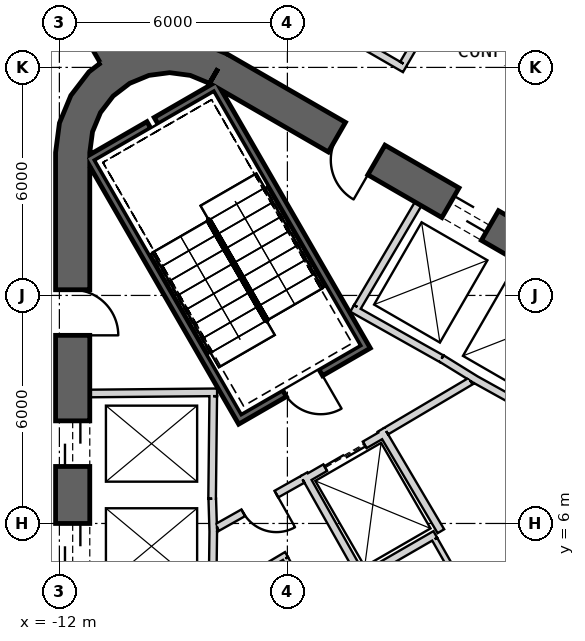
"""IFC4 building model, lengths in metres.
Left out: names, types, materials, properties, quantities, classifications, styles, units other than length and angle.
Written with IfcOpenShell. Run it as: python <this file> out.ifc"""

import sys

from ifc_helpers import new_model, si_unit, direction, frame, frame_2d, origin, place, context, subcontext, project, spatial, polyline, rectangle, outline, extrude, element, fill, save


model = new_model("IFC4")
c1 = context("Model", 3, precision=1e-05, world=origin(), true_north=direction((0.0, 1.0)))
c2 = subcontext(c1, "Body", "Model", "MODEL_VIEW")
j1 = project(units=[si_unit("LENGTHUNIT", "METRE"), si_unit("PLANEANGLEUNIT", "RADIAN")], contexts=[c1])
p1 = place(None, origin())
s1 = spatial("IfcSite", under=j1, at=p1, CompositionType="ELEMENT")
p2 = place(p1, origin())
s2 = spatial("IfcBuilding", under=s1, at=p2, CompositionType="ELEMENT")
p3 = place(p2, frame((0.0, 0.0, 15.5)))
s3 = spatial("IfcBuildingStorey", under=s2, at=p3, CompositionType="ELEMENT", Elevation=15.5)
p4 = place(p3, frame((19.475, 2.208, 0.0), z_axis=(0.0, 0.0, 1.0), x_axis=(-0.866028369851, 0.499994862586, 0.0)))
e1 = element("IfcWall", 1, at=p4, inside=s3, PredefinedType="SHEAR", context=c2, shape_type="SweptSolid", body=[
    extrude(rectangle(XDim=31.523, YDim=0.9, at=frame_2d((15.762, 0.0))), origin(), (0.0, 0.0, 1.0), 6.0),
])
p5 = place(p4, frame((7.062, 0.0, 0.0)))
e2 = element("IfcOpeningElement", 2, at=p5, cuts=e1, PredefinedType="OPENING", context=c2, shape_type="SweptSolid", body=[
    extrude(rectangle(XDim=1.2, YDim=2.4, at=frame_2d((0.6, 1.2))), frame((0.0, 0.46, 0.0), z_axis=(0.0, -1.0, 0.0), x_axis=(1.0, 0.0, 0.0)), (0.0, 0.0, 1.0), 0.92),
])
p6 = place(p4, frame((9.762, 0.0, 0.0)))
e3 = element("IfcOpeningElement", 3, at=p6, cuts=e1, PredefinedType="OPENING", context=c2, shape_type="SweptSolid", body=[
    extrude(rectangle(XDim=1.2, YDim=2.4, at=frame_2d((0.6, 1.2))), frame((0.0, 0.46, 0.0), z_axis=(0.0, -1.0, 0.0), x_axis=(1.0, 0.0, 0.0)), (0.0, 0.0, 1.0), 0.92),
])
p7 = place(p4, frame((12.462, 0.0, 0.0)))
e4 = element("IfcOpeningElement", 4, at=p7, cuts=e1, PredefinedType="OPENING", context=c2, shape_type="SweptSolid", body=[
    extrude(rectangle(XDim=1.2, YDim=2.4, at=frame_2d((0.6, 1.2))), frame((0.0, 0.46, 0.0), z_axis=(0.0, -1.0, 0.0), x_axis=(1.0, 0.0, 0.0)), (0.0, 0.0, 1.0), 0.92),
])
p8 = place(p4, frame((15.162, 0.0, 0.0)))
e5 = element("IfcOpeningElement", 5, at=p8, cuts=e1, PredefinedType="OPENING", context=c2, shape_type="SweptSolid", body=[
    extrude(rectangle(XDim=1.2, YDim=2.4, at=frame_2d((0.6, 1.2))), frame((0.0, 0.46, 0.0), z_axis=(0.0, -1.0, 0.0), x_axis=(1.0, 0.0, 0.0)), (0.0, 0.0, 1.0), 0.92),
])
p9 = place(p4, frame((17.862, 0.0, 0.0)))
e6 = element("IfcOpeningElement", 6, at=p9, cuts=e1, PredefinedType="OPENING", context=c2, shape_type="SweptSolid", body=[
    extrude(rectangle(XDim=1.2, YDim=2.4, at=frame_2d((0.6, 1.2))), frame((0.0, 0.46, 0.0), z_axis=(0.0, -1.0, 0.0), x_axis=(1.0, 0.0, 0.0)), (0.0, 0.0, 1.0), 0.92),
])
p10 = place(p4, frame((20.562, 0.0, 0.0)))
e7 = element("IfcOpeningElement", 7, at=p10, cuts=e1, PredefinedType="OPENING", context=c2, shape_type="SweptSolid", body=[
    extrude(rectangle(XDim=1.2, YDim=2.4, at=frame_2d((0.6, 1.2))), frame((0.0, 0.46, 0.0), z_axis=(0.0, -1.0, 0.0), x_axis=(1.0, 0.0, 0.0)), (0.0, 0.0, 1.0), 0.92),
])
p11 = place(p4, frame((23.262, 0.0, 0.0)))
e8 = element("IfcOpeningElement", 8, at=p11, cuts=e1, PredefinedType="OPENING", context=c2, shape_type="SweptSolid", body=[
    extrude(rectangle(XDim=1.2, YDim=2.4, at=frame_2d((0.6, 1.2))), frame((0.0, 0.46, 0.0), z_axis=(0.0, -1.0, 0.0), x_axis=(1.0, 0.0, 0.0)), (0.0, 0.0, 1.0), 0.92),
])
p12 = place(p4, frame((3.612, 0.0, 0.0)))
e9 = element("IfcOpeningElement", 9, at=p12, cuts=e1, PredefinedType="OPENING", context=c2, shape_type="SweptSolid", body=[
    extrude(rectangle(XDim=1.2, YDim=2.4, at=frame_2d((0.6, 1.2))), frame((0.0, 0.46, 0.0), z_axis=(0.0, -1.0, 0.0), x_axis=(1.0, 0.0, 0.0)), (0.0, 0.0, 1.0), 0.92),
])
p13 = place(p4, frame((26.712, 0.0, 0.0)))
e10 = element("IfcOpeningElement", 10, at=p13, cuts=e1, PredefinedType="OPENING", context=c2, shape_type="SweptSolid", body=[
    extrude(rectangle(XDim=1.2, YDim=2.4, at=frame_2d((0.6, 1.2))), frame((0.0, 0.46, 0.0), z_axis=(0.0, -1.0, 0.0), x_axis=(1.0, 0.0, 0.0)), (0.0, 0.0, 1.0), 0.92),
])
p14 = place(p3, frame((-11.65, 15.762, 0.0), z_axis=(0.0, 0.0, 1.0), x_axis=(0.0, -1.0, 0.0)))
e11 = element("IfcWall", 11, at=p14, inside=s3, PredefinedType="SHEAR", context=c2, shape_type="SweptSolid", body=[
    extrude(rectangle(XDim=31.523, YDim=0.9, at=frame_2d((15.762, 0.0))), origin(), (0.0, 0.0, 1.0), 6.0),
])
p15 = place(p14, frame((7.062, 0.0, 0.0)))
e12 = element("IfcOpeningElement", 12, at=p15, cuts=e11, PredefinedType="OPENING", context=c2, shape_type="SweptSolid", body=[
    extrude(rectangle(XDim=1.2, YDim=2.4, at=frame_2d((0.6, 1.2))), frame((0.0, 0.46, 0.0), z_axis=(0.0, -1.0, 0.0), x_axis=(1.0, 0.0, 0.0)), (0.0, 0.0, 1.0), 0.92),
])
p16 = place(p14, frame((9.762, 0.0, 0.0)))
e13 = element("IfcOpeningElement", 13, at=p16, cuts=e11, PredefinedType="OPENING", context=c2, shape_type="SweptSolid", body=[
    extrude(rectangle(XDim=1.2, YDim=2.4, at=frame_2d((0.6, 1.2))), frame((0.0, 0.46, 0.0), z_axis=(0.0, -1.0, 0.0), x_axis=(1.0, 0.0, 0.0)), (0.0, 0.0, 1.0), 0.92),
])
p17 = place(p14, frame((12.462, 0.0, 0.0)))
e14 = element("IfcOpeningElement", 14, at=p17, cuts=e11, PredefinedType="OPENING", context=c2, shape_type="SweptSolid", body=[
    extrude(rectangle(XDim=1.2, YDim=2.4, at=frame_2d((0.6, 1.2))), frame((0.0, 0.46, 0.0), z_axis=(0.0, -1.0, 0.0), x_axis=(1.0, 0.0, 0.0)), (0.0, 0.0, 1.0), 0.92),
])
p18 = place(p14, frame((15.162, 0.0, 0.0)))
e15 = element("IfcOpeningElement", 15, at=p18, cuts=e11, PredefinedType="OPENING", context=c2, shape_type="SweptSolid", body=[
    extrude(rectangle(XDim=1.2, YDim=2.4, at=frame_2d((0.6, 1.2))), frame((0.0, 0.46, 0.0), z_axis=(0.0, -1.0, 0.0), x_axis=(1.0, 0.0, 0.0)), (0.0, 0.0, 1.0), 0.92),
])
p19 = place(p14, frame((17.862, 0.0, 0.0)))
e16 = element("IfcOpeningElement", 16, at=p19, cuts=e11, PredefinedType="OPENING", context=c2, shape_type="SweptSolid", body=[
    extrude(rectangle(XDim=1.2, YDim=2.4, at=frame_2d((0.6, 1.2))), frame((0.0, 0.46, 0.0), z_axis=(0.0, -1.0, 0.0), x_axis=(1.0, 0.0, 0.0)), (0.0, 0.0, 1.0), 0.92),
])
p20 = place(p14, frame((20.562, 0.0, 0.0)))
e17 = element("IfcOpeningElement", 17, at=p20, cuts=e11, PredefinedType="OPENING", context=c2, shape_type="SweptSolid", body=[
    extrude(rectangle(XDim=1.2, YDim=2.4, at=frame_2d((0.6, 1.2))), frame((0.0, 0.46, 0.0), z_axis=(0.0, -1.0, 0.0), x_axis=(1.0, 0.0, 0.0)), (0.0, 0.0, 1.0), 0.92),
])
p21 = place(p14, frame((23.262, 0.0, 0.0)))
e18 = element("IfcOpeningElement", 18, at=p21, cuts=e11, PredefinedType="OPENING", context=c2, shape_type="SweptSolid", body=[
    extrude(rectangle(XDim=1.2, YDim=2.4, at=frame_2d((0.6, 1.2))), frame((0.0, 0.46, 0.0), z_axis=(0.0, -1.0, 0.0), x_axis=(1.0, 0.0, 0.0)), (0.0, 0.0, 1.0), 0.92),
])
p22 = place(p14, frame((3.612, 0.0, 0.0)))
e19 = element("IfcOpeningElement", 19, at=p22, cuts=e11, PredefinedType="OPENING", context=c2, shape_type="SweptSolid", body=[
    extrude(rectangle(XDim=1.2, YDim=2.4, at=frame_2d((0.6, 1.2))), frame((0.0, 0.46, 0.0), z_axis=(0.0, -1.0, 0.0), x_axis=(1.0, 0.0, 0.0)), (0.0, 0.0, 1.0), 0.92),
])
p23 = place(p14, frame((26.712, 0.0, 0.0)))
e20 = element("IfcOpeningElement", 20, at=p23, cuts=e11, PredefinedType="OPENING", context=c2, shape_type="SweptSolid", body=[
    extrude(rectangle(XDim=1.2, YDim=2.4, at=frame_2d((0.6, 1.2))), frame((0.0, 0.46, 0.0), z_axis=(0.0, -1.0, 0.0), x_axis=(1.0, 0.0, 0.0)), (0.0, 0.0, 1.0), 0.92),
])
p24 = place(p3, origin())
e21 = element("IfcWall", 21, at=p24, inside=s3, PredefinedType="SHEAR", context=c2, shape_type="SweptSolid", body=[
    extrude(outline(polyline([(-7.6, 18.36), (-8.323, 18.659), (-9.1, 18.762), (-9.876, 18.659), (-10.6, 18.36), (-11.221, 17.883), (-11.698, 17.262), (-11.998, 16.538), (-12.1, 15.762), (-11.2, 15.762), (-11.128, 16.305), (-10.919, 16.812), (-10.585, 17.247), (-10.15, 17.58), (-9.644, 17.79), (-9.1, 17.862), (-8.556, 17.79), (-8.05, 17.58), (-7.6, 18.36)])), origin(), (0.0, 0.0, 1.0), 6.0),
])
p25 = place(p3, frame((-10.575, 18.316, 0.0), z_axis=(0.0, 0.0, 1.0), x_axis=(-0.499996575515, 0.866027380903, 0.0)))
e22 = element("IfcWall", 22, at=p25, inside=s3, PredefinedType="SHEAR", context=c2, shape_type="SweptSolid", body=[
    extrude(rectangle(XDim=13.954, YDim=0.8, at=frame_2d((6.977, 0.0))), origin(), (0.0, 0.0, 1.0), 6.0),
])
p26 = place(p25, frame((2.05, 0.0, 0.0)))
e23 = element("IfcOpeningElement", 23, at=p26, cuts=e22, PredefinedType="OPENING", context=c2, shape_type="SweptSolid", body=[
    extrude(rectangle(XDim=1.4, YDim=2.4, at=frame_2d((0.7, 1.2))), frame((0.0, 0.41, 0.0), z_axis=(0.0, -1.0, 0.0), x_axis=(1.0, 0.0, 0.0)), (0.0, 0.0, 1.0), 0.82),
])
p27 = place(p3, frame((-11.2, 9.42, 0.0), z_axis=(0.0, 0.0, 1.0), x_axis=(0.999957167047, 0.009255488683, 0.0)))
e24 = element("IfcWall", 24, at=p27, inside=s3, PredefinedType="PLUMBINGWALL", context=c2, shape_type="SweptSolid", body=[
    extrude(rectangle(XDim=3.35, YDim=0.2, at=frame_2d((1.675, 0.0))), origin(), (0.0, 0.0, 1.0), 5.7),
])
p28 = place(p3, frame((-7.951, 9.35, 0.0), z_axis=(0.0, 0.0, 1.0), x_axis=(-0.011120469654, -0.999938165666, 0.0)))
e25 = element("IfcWall", 25, at=p28, inside=s3, PredefinedType="PLUMBINGWALL", context=c2, shape_type="SweptSolid", body=[
    extrude(rectangle(XDim=2.7, YDim=0.2, at=frame_2d((1.35, 0.0))), origin(), (0.0, 0.0, 1.0), 5.7),
])
p29 = place(p3, frame((-7.977, 6.65, 0.0), z_axis=(0.0, 0.0, 1.0), x_axis=(0.030861509705, -0.999523670164, 0.0)))
e26 = element("IfcWall", 26, at=p29, inside=s3, PredefinedType="PLUMBINGWALL", context=c2, shape_type="SweptSolid", body=[
    extrude(rectangle(XDim=0.878, YDim=0.2, at=frame_2d((0.439, 0.0))), origin(), (0.0, 0.0, 1.0), 5.7),
])
p30 = place(p3, frame((-7.949, 5.895, 0.0), z_axis=(0.0, 0.0, 1.0), x_axis=(-0.012042535896, -0.999927486035, 0.0)))
e27 = element("IfcWall", 27, at=p30, inside=s3, PredefinedType="PLUMBINGWALL", context=c2, shape_type="SweptSolid", body=[
    extrude(rectangle(XDim=1.845, YDim=0.2, at=frame_2d((0.922, 0.0))), origin(), (0.0, 0.0, 1.0), 5.7),
])
p31 = place(p3, frame((-1.941, 10.339, 0.0), z_axis=(0.0, 0.0, 1.0), x_axis=(0.850216889117, -0.526432561171, 0.0)))
e28 = element("IfcWall", 28, at=p31, inside=s3, PredefinedType="PLUMBINGWALL", context=c2, shape_type="SweptSolid", body=[
    extrude(rectangle(XDim=1.078, YDim=0.2, at=frame_2d((0.539, 0.0))), origin(), (0.0, 0.0, 1.0), 5.7),
])
p32 = place(p3, frame((0.483, 8.936, 0.0), z_axis=(0.0, 0.0, 1.0), x_axis=(-0.874269620932, 0.485440655401, 0.0)))
e29 = element("IfcWall", 29, at=p32, inside=s3, PredefinedType="PLUMBINGWALL", context=c2, shape_type="SweptSolid", body=[
    extrude(rectangle(XDim=1.845, YDim=0.2, at=frame_2d((0.922, 0.0))), origin(), (0.0, 0.0, 1.0), 5.7),
])
p33 = place(p3, frame((-4.296, 11.659, 0.0), z_axis=(0.0, 0.0, 1.0), x_axis=(0.871534483978, -0.490334215854, 0.0)))
e30 = element("IfcWall", 30, at=p33, inside=s3, PredefinedType="PLUMBINGWALL", context=c2, shape_type="SweptSolid", body=[
    extrude(rectangle(XDim=2.7, YDim=0.2, at=frame_2d((1.35, 0.0))), origin(), (0.0, 0.0, 1.0), 5.7),
])
p34 = place(p3, frame((-4.158, 11.696, 0.0), z_axis=(0.0, 0.0, 1.0), x_axis=(0.508018930956, 0.861345903683, 0.0)))
e31 = element("IfcWall", 31, at=p34, inside=s3, PredefinedType="PLUMBINGWALL", context=c2, shape_type="SweptSolid", body=[
    extrude(rectangle(XDim=3.15, YDim=0.2, at=frame_2d((1.575, 0.0))), origin(), (0.0, 0.0, 1.0), 5.7),
])
p35 = place(p3, frame((-11.245, 15.678, -0.3), z_axis=(0.0, 0.0, 1.0), x_axis=(0.499977274689, -0.866038523851, 0.0)))
e32 = element("IfcWall", 32, at=p35, inside=s3, PredefinedType="SHEAR", context=c2, shape_type="SweptSolid", body=[
    extrude(rectangle(XDim=8.1, YDim=0.2, at=frame_2d((4.05, 0.0))), origin(), (0.0, 0.0, 1.0), 6.0),
])
p36 = place(p3, frame((-7.818, 17.541, -0.3), z_axis=(0.0, 0.0, 1.0), x_axis=(-0.866088799389, -0.499890179513, 0.0)))
e33 = element("IfcWall", 33, at=p36, inside=s3, PredefinedType="SHEAR", context=c2, shape_type="SweptSolid", body=[
    extrude(rectangle(XDim=1.89, YDim=0.2, at=frame_2d((0.945, 0.0))), origin(), (0.0, 0.0, 1.0), 6.0),
])
p37 = place(p3, frame((-9.645, 16.486, -0.3), z_axis=(0.0, 0.0, 1.0), x_axis=(-0.866038843867, -0.499976720371, 0.0)))
e34 = element("IfcWall", 34, at=p37, inside=s3, PredefinedType="SHEAR", context=c2, shape_type="SweptSolid", body=[
    extrude(rectangle(XDim=1.69, YDim=0.2, at=frame_2d((0.845, 0.0))), origin(), (0.0, 0.0, 1.0), 6.0),
])
p38 = place(p3, frame((-7.854, 17.405, -0.3), z_axis=(0.0, 0.0, 1.0), x_axis=(0.499997992926, -0.866026562566, 0.0)))
e35 = element("IfcWall", 35, at=p38, inside=s3, PredefinedType="SHEAR", context=c2, shape_type="SweptSolid", body=[
    extrude(rectangle(XDim=7.9, YDim=0.2, at=frame_2d((3.95, 0.0))), origin(), (0.0, 0.0, 1.0), 6.0),
])
p39 = place(p3, frame((-7.159, 8.8, -0.3), z_axis=(0.0, 0.0, 1.0), x_axis=(0.866047807691, 0.499961193289, 0.0)))
e36 = element("IfcWall", 36, at=p39, inside=s3, PredefinedType="SHEAR", context=c2, shape_type="SweptSolid", body=[
    extrude(rectangle(XDim=3.6, YDim=0.2, at=frame_2d((1.8, 0.0))), origin(), (0.0, 0.0, 1.0), 6.0),
])
p40 = place(p39, frame((1.25, 0.0, 0.3)))
e37 = element("IfcOpeningElement", 37, at=p40, cuts=e36, PredefinedType="OPENING", context=c2, shape_type="SweptSolid", body=[
    extrude(rectangle(XDim=1.1, YDim=2.1, at=frame_2d((0.55, 1.05))), frame((0.0, 0.11, 0.0), z_axis=(0.0, -1.0, 0.0), x_axis=(1.0, 0.0, 0.0)), (0.0, 0.0, 1.0), 0.22),
])
p41 = place(p3, frame((-5.524, 7.168, 0.0), z_axis=(0.0, 0.0, 1.0), x_axis=(0.866024647952, 0.500001309137, 0.0)))
e38 = element("IfcWall", 38, at=p41, inside=s3, PredefinedType="PLUMBINGWALL", context=c2, shape_type="SweptSolid", body=[
    extrude(rectangle(XDim=2.4, YDim=0.2, at=frame_2d((1.2, 0.0))), origin(), (0.0, 0.0, 1.0), 5.7),
])
p42 = place(p41, frame((0.6, 0.0, 0.0)))
e39 = element("IfcOpeningElement", 39, at=p42, cuts=e38, PredefinedType="OPENING", context=c2, shape_type="SweptSolid", body=[
    extrude(rectangle(XDim=1.2, YDim=2.4, at=frame_2d((0.6, 1.2))), frame((0.0, 0.11, 0.0), z_axis=(0.0, -1.0, 0.0), x_axis=(1.0, 0.0, 0.0)), (0.0, 0.0, 1.0), 0.22),
])
p43 = place(p3, frame((-3.538, 8.465, 0.0), z_axis=(0.0, 0.0, 1.0), x_axis=(0.508647062354, -0.860975125052, 0.0)))
e40 = element("IfcWall", 40, at=p43, inside=s3, PredefinedType="PLUMBINGWALL", context=c2, shape_type="SweptSolid", body=[
    extrude(rectangle(XDim=3.1, YDim=0.2, at=frame_2d((1.55, 0.0))), origin(), (0.0, 0.0, 1.0), 5.7),
])
p44 = place(p3, frame((-2.108, 5.711, 0.0), z_axis=(0.0, 0.0, 1.0), x_axis=(-0.866009305107, -0.50002788269, 0.0)))
e41 = element("IfcWall", 41, at=p44, inside=s3, PredefinedType="PLUMBINGWALL", context=c2, shape_type="SweptSolid", body=[
    extrude(rectangle(XDim=2.329, YDim=0.2, at=frame_2d((1.165, 0.0))), origin(), (0.0, 0.0, 1.0), 5.7),
])
p45 = place(p3, frame((-5.562, 7.296, 0.0), z_axis=(0.0, 0.0, 1.0), x_axis=(0.49134651263, -0.870964180966, 0.0)))
e42 = element("IfcWall", 42, at=p45, inside=s3, PredefinedType="PLUMBINGWALL", context=c2, shape_type="SweptSolid", body=[
    extrude(rectangle(XDim=3.0, YDim=0.2, at=frame_2d((1.5, 0.0))), origin(), (0.0, 0.0, 1.0), 5.7),
])
p46 = place(p3, frame((-1.18, 9.744, 0.0), z_axis=(0.0, 0.0, 1.0), x_axis=(-0.860615607571, -0.509255118781, 0.0)))
e43 = element("IfcWall", 43, at=p46, inside=s3, PredefinedType="PARTITIONING", context=c2, shape_type="SweptSolid", body=[
    extrude(rectangle(XDim=2.581, YDim=0.2, at=frame_2d((1.29, 0.0))), origin(), (0.0, 0.0, 1.0), 5.7),
])
p47 = place(p3, frame((-5.6, 7.16, 0.0), z_axis=(0.0, 0.0, 1.0), x_axis=(-0.871363259478, -0.490638431059, 0.0)))
e44 = element("IfcWall", 44, at=p47, inside=s3, PredefinedType="PARTITIONING", context=c2, shape_type="SweptSolid", body=[
    extrude(rectangle(XDim=2.581, YDim=0.2, at=frame_2d((1.291, 0.0))), origin(), (0.0, 0.0, 1.0), 5.7),
])
p48 = place(p47, frame((0.791, 0.0, 0.0)))
e45 = element("IfcOpeningElement", 45, at=p48, cuts=e44, PredefinedType="OPENING", context=c2, shape_type="SweptSolid", body=[
    extrude(rectangle(XDim=1.0, YDim=2.1, at=frame_2d((0.5, 1.05))), frame((0.0, 0.11, 0.0), z_axis=(0.0, -1.0, 0.0), x_axis=(1.0, 0.0, 0.0)), (0.0, 0.0, 1.0), 0.22),
])
p49 = place(p3, frame((-2.124, 5.586, 0.0), z_axis=(0.0, 0.0, 1.0), x_axis=(0.494514430604, -0.869169418424, 0.0)))
e46 = element("IfcWall", 46, at=p49, inside=s3, PredefinedType="PLUMBINGWALL", context=c2, shape_type="SweptSolid", body=[
    extrude(rectangle(XDim=4.534, YDim=0.15, at=frame_2d((2.267, 0.0))), origin(), (0.0, 0.0, 1.0), 5.7),
])
p50 = place(p3, frame((-6.024, 5.183, 0.0), z_axis=(0.0, 0.0, 1.0), x_axis=(-0.860126804455, -0.510080268447, 0.0)))
e47 = element("IfcWall", 47, at=p50, inside=s3, PredefinedType="PLUMBINGWALL", context=c2, shape_type="SweptSolid", body=[
    extrude(rectangle(XDim=2.24, YDim=0.15, at=frame_2d((1.12, 0.0))), origin(), (0.0, 0.0, 1.0), 5.7),
])
p51 = place(p3, frame((-4.983, 3.172, 0.0), z_axis=(0.0, 0.0, 1.0), x_axis=(-0.488701962514, 0.872450796226, 0.0)))
e48 = element("IfcWall", 48, at=p51, inside=s3, PredefinedType="PLUMBINGWALL", context=c2, shape_type="SweptSolid", body=[
    extrude(rectangle(XDim=2.187, YDim=0.15, at=frame_2d((1.093, 0.0))), origin(), (0.0, 0.0, 1.0), 5.7),
])
p52 = place(p3, frame((-2.909, 17.962, 0.0), z_axis=(0.0, 0.0, 1.0), x_axis=(-0.866156637233, 0.499772628079, 0.0)))
e49 = element("IfcWall", 49, at=p52, inside=s3, PredefinedType="PARTITIONING", context=c2, shape_type="SweptSolid", body=[
    extrude(rectangle(XDim=3.931, YDim=0.2, at=frame_2d((1.966, 0.0))), origin(), (0.0, 0.0, 1.0), 4.88),
])
p53 = place(p3, frame((-2.945, 18.098, 0.0), z_axis=(0.0, 0.0, 1.0), x_axis=(0.503235430028, 0.864149351654, 0.0)))
e50 = element("IfcWall", 50, at=p53, inside=s3, PredefinedType="PARTITIONING", context=c2, shape_type="SweptSolid", body=[
    extrude(rectangle(XDim=8.002, YDim=0.2, at=frame_2d((4.001, 0.0))), origin(), (0.0, 0.0, 1.0), 5.17),
])
p54 = place(p53, frame((3.402, 0.0, 0.0)))
e51 = element("IfcOpeningElement", 51, at=p54, cuts=e50, PredefinedType="OPENING", context=c2, shape_type="SweptSolid", body=[
    extrude(rectangle(XDim=1.0, YDim=2.1, at=frame_2d((0.5, 1.05))), frame((0.0, 0.11, 0.0), z_axis=(0.0, -1.0, 0.0), x_axis=(1.0, 0.0, 0.0)), (0.0, 0.0, 1.0), 0.22),
])
p55 = place(p40, origin())
e52 = element("IfcDoor", 52, at=p55, inside=s3, OperationType="SINGLE_SWING_RIGHT", PredefinedType="USERDEFINED", context=c2, shape_type="SweptSolid", body=[
    extrude(rectangle(XDim=1.1, YDim=2.1, at=frame_2d((0.55, 1.05))), frame((0.0, 0.025, 0.0), z_axis=(0.0, -1.0, 0.0), x_axis=(1.0, 0.0, 0.0)), (0.0, 0.0, 1.0), 0.05),
])
fill(e37, e52)
p56 = place(p48, origin())
e53 = element("IfcDoor", 53, at=p56, inside=s3, OperationType="SINGLE_SWING_LEFT", PredefinedType="USERDEFINED", context=c2, shape_type="SweptSolid", body=[
    extrude(rectangle(XDim=1.0, YDim=2.1, at=frame_2d((0.5, 1.05))), frame((0.0, 0.025, 0.0), z_axis=(0.0, -1.0, 0.0), x_axis=(1.0, 0.0, 0.0)), (0.0, 0.0, 1.0), 0.05),
])
fill(e45, e53)
p57 = place(p42, origin())
e54 = element("IfcDoor", 54, at=p57, inside=s3, OperationType="SLIDING_TO_LEFT", PredefinedType="USERDEFINED", context=c2, shape_type="SweptSolid", body=[
    extrude(rectangle(XDim=1.2, YDim=2.4, at=frame_2d((0.6, 1.2))), frame((0.0, 0.025, 0.0), z_axis=(0.0, -1.0, 0.0), x_axis=(1.0, 0.0, 0.0)), (0.0, 0.0, 1.0), 0.05),
])
fill(e39, e54)
p58 = place(p15, origin())
e55 = element("IfcDoor", 55, at=p58, inside=s3, OperationType="SLIDING_TO_LEFT", PredefinedType="USERDEFINED", context=c2, shape_type="SweptSolid", body=[
    extrude(rectangle(XDim=1.2, YDim=2.4, at=frame_2d((0.6, 1.2))), frame((0.0, 0.025, 0.0), z_axis=(0.0, -1.0, 0.0), x_axis=(1.0, 0.0, 0.0)), (0.0, 0.0, 1.0), 0.05),
])
fill(e12, e55)
p59 = place(p16, origin())
e56 = element("IfcDoor", 56, at=p59, inside=s3, OperationType="SLIDING_TO_LEFT", PredefinedType="USERDEFINED", context=c2, shape_type="SweptSolid", body=[
    extrude(rectangle(XDim=1.2, YDim=2.4, at=frame_2d((0.6, 1.2))), frame((0.0, 0.025, 0.0), z_axis=(0.0, -1.0, 0.0), x_axis=(1.0, 0.0, 0.0)), (0.0, 0.0, 1.0), 0.05),
])
fill(e13, e56)
p60 = place(p11, origin())
e57 = element("IfcDoor", 57, at=p60, inside=s3, OperationType="SLIDING_TO_LEFT", PredefinedType="USERDEFINED", context=c2, shape_type="SweptSolid", body=[
    extrude(rectangle(XDim=1.2, YDim=2.4, at=frame_2d((0.6, 1.2))), frame((0.0, 0.025, 0.0), z_axis=(0.0, -1.0, 0.0), x_axis=(1.0, 0.0, 0.0)), (0.0, 0.0, 1.0), 0.05),
])
fill(e8, e57)
p61 = place(p13, origin())
e58 = element("IfcDoor", 58, at=p61, inside=s3, OperationType="SINGLE_SWING_LEFT", PredefinedType="USERDEFINED", context=c2, shape_type="SweptSolid", body=[
    extrude(rectangle(XDim=1.2, YDim=2.4, at=frame_2d((0.6, 1.2))), frame((0.0, 0.025, 0.0), z_axis=(0.0, -1.0, 0.0), x_axis=(1.0, 0.0, 0.0)), (0.0, 0.0, 1.0), 0.05),
])
fill(e10, e58)
p62 = place(p22, origin())
e59 = element("IfcDoor", 59, at=p62, inside=s3, OperationType="SINGLE_SWING_RIGHT", PredefinedType="USERDEFINED", context=c2, shape_type="SweptSolid", body=[
    extrude(rectangle(XDim=1.2, YDim=2.4, at=frame_2d((0.6, 1.2))), frame((0.0, 0.025, 0.0), z_axis=(0.0, -1.0, 0.0), x_axis=(1.0, 0.0, 0.0)), (0.0, 0.0, 1.0), 0.05),
])
fill(e19, e59)
save(model, sys.argv[1])
